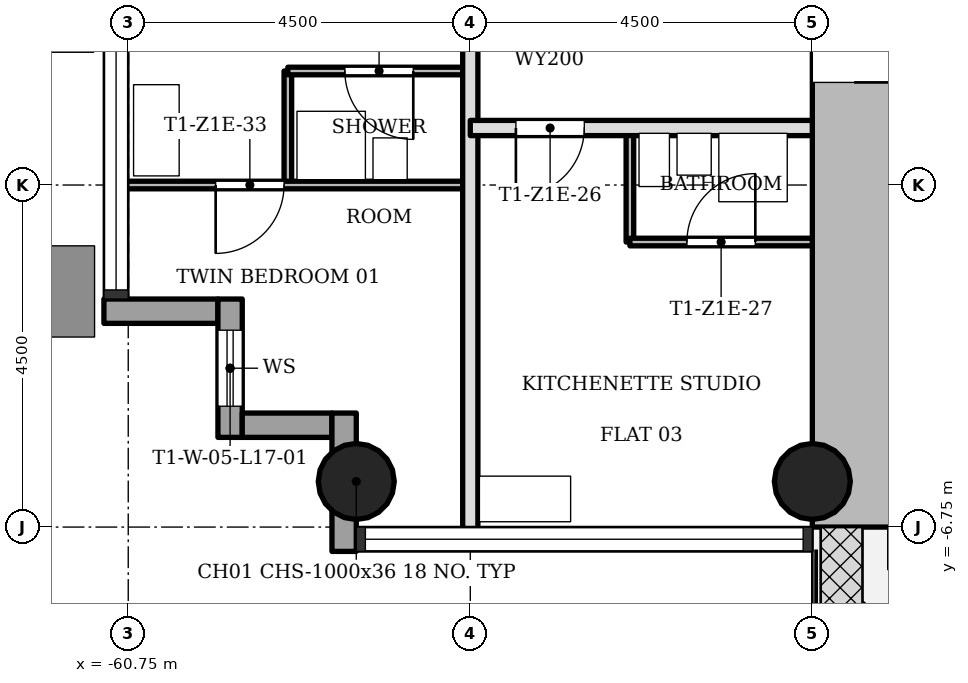
"""IFC4 building model, lengths in metres.
Left out: names, types, materials, properties, quantities, classifications, styles, units other than length and angle.
Written with IfcOpenShell. Run it as: python <this file> out.ifc"""

import sys

from ifc_helpers import new_model, si_unit, direction, frame, frame_2d, origin, origin_2d, place, context, subcontext, project, spatial, rectangle, hollow_circle, extrude, element, fill, save


model = new_model("IFC4")
c1 = context("Model", 3, precision=1e-05, world=origin(), true_north=direction((0.0, 1.0)))
c2 = subcontext(c1, "Body", "Model", "MODEL_VIEW")
j1 = project(units=[si_unit("LENGTHUNIT", "METRE"), si_unit("PLANEANGLEUNIT", "RADIAN")], contexts=[c1])
p1 = place(None, origin())
s1 = spatial("IfcSite", under=j1, at=p1, CompositionType="ELEMENT")
p2 = place(p1, origin())
s2 = spatial("IfcBuilding", under=s1, at=p2, CompositionType="ELEMENT")
p3 = place(p2, frame((0.0, 0.0, 65.3)))
s3 = spatial("IfcBuildingStorey", under=s2, at=p3, CompositionType="ELEMENT", Elevation=65.3)
p4 = place(p3, frame((-51.2, 5.65, 0.0), z_axis=(0.0, 0.0, 1.0), x_axis=(0.0, -1.0, 0.0)))
e1 = element("IfcWall", 1, at=p4, inside=s3, PredefinedType="SHEAR", context=c2, shape_type="SweptSolid", body=[
    extrude(rectangle(XDim=12.4, YDim=1.1, at=frame_2d((6.2, 0.0))), origin(), (0.0, 0.0, 1.0), 3.4),
])
p5 = place(p4, frame((4.75, 0.0, 0.0)))
e2 = element("IfcOpeningElement", 2, at=p5, cuts=e1, PredefinedType="OPENING", context=c2, shape_type="SweptSolid", body=[
    extrude(rectangle(XDim=1.8, YDim=2.1, at=frame_2d((0.9, 1.05))), frame((0.0, 0.56, 0.0), z_axis=(0.0, -1.0, 0.0), x_axis=(1.0, 0.0, 0.0)), (0.0, 0.0, 1.0), 1.12),
])
for number, where, z_axis, x_axis in (
    (3, (-51.75, -6.15, 0.0), (0.0, 0.0, 1.0), (1.0, 0.0, 0.0)),
    (4, (-57.75, -6.15, 0.0), (0.0, 0.0, 1.0), (1.0, 0.0, 0.0)),
):
    element("IfcColumn", number, at=place(p3, frame(where, z_axis=z_axis, x_axis=x_axis)), inside=s3, PredefinedType="COLUMN", context=c2, shape_type="SweptSolid", body=[
        extrude(hollow_circle(Radius=0.5, WallThickness=0.036, at=origin_2d()), origin(), (0.0, 0.0, 1.0), 3.4),
    ])
p6 = place(p3, frame((-61.07, -3.91, -0.3), z_axis=(0.0, 0.0, 1.0), x_axis=(1.0, 0.0, 0.0)))
e5 = element("IfcWall", 5, at=p6, inside=s3, PredefinedType="STANDARD", context=c2, shape_type="SweptSolid", body=[
    extrude(rectangle(XDim=1.5, YDim=0.32, at=frame_2d((0.75, 0.0))), origin(), (0.0, 0.0, 1.0), 3.4),
])
p7 = place(p3, frame((-59.41, -3.75, -0.3), z_axis=(0.0, 0.0, 1.0), x_axis=(0.0, -1.0, 0.0)))
e6 = element("IfcWall", 6, at=p7, inside=s3, PredefinedType="STANDARD", context=c2, shape_type="SweptSolid", body=[
    extrude(rectangle(XDim=1.82, YDim=0.32, at=frame_2d((0.91, 0.0))), origin(), (0.0, 0.0, 1.0), 3.4),
])
p8 = place(p7, frame((0.41, 0.0, 1.2)))
e7 = element("IfcOpeningElement", 7, at=p8, cuts=e6, PredefinedType="OPENING", context=c2, shape_type="SweptSolid", body=[
    extrude(rectangle(XDim=1.0, YDim=1.5, at=frame_2d((0.5, 0.75))), frame((0.0, 0.17, 0.0), z_axis=(0.0, -1.0, 0.0), x_axis=(1.0, 0.0, 0.0)), (0.0, 0.0, 1.0), 0.34),
])
p9 = place(p3, frame((-59.25, -5.41, -0.3), z_axis=(0.0, 0.0, 1.0), x_axis=(1.0, 0.0, 0.0)))
e8 = element("IfcWall", 8, at=p9, inside=s3, PredefinedType="STANDARD", context=c2, shape_type="SweptSolid", body=[
    extrude(rectangle(XDim=1.18, YDim=0.32, at=frame_2d((0.59, 0.0))), origin(), (0.0, 0.0, 1.0), 3.4),
])
p10 = place(p3, frame((-57.91, -5.25, -0.3), z_axis=(0.0, 0.0, 1.0), x_axis=(0.0, -1.0, 0.0)))
e9 = element("IfcWall", 9, at=p10, inside=s3, PredefinedType="STANDARD", context=c2, shape_type="SweptSolid", body=[
    extrude(rectangle(XDim=1.82, YDim=0.32, at=frame_2d((0.91, 0.0))), origin(), (0.0, 0.0, 1.0), 3.4),
])
p11 = place(p3, frame((-58.65, -2.25, 0.0), z_axis=(0.0, 0.0, 1.0), x_axis=(0.0, 1.0, 0.0)))
e10 = element("IfcWall", 10, at=p11, inside=s3, PredefinedType="PARTITIONING", context=c2, shape_type="SweptSolid", body=[
    extrude(rectangle(XDim=1.5, YDim=0.1, at=frame_2d((0.75, 0.0))), origin(), (0.0, 0.0, 1.0), 3.0),
])
p12 = place(p3, frame((-56.25, -6.85, 0.0), z_axis=(0.0, 0.0, 1.0), x_axis=(0.0, 1.0, 0.0)))
e11 = element("IfcWall", 11, at=p12, inside=s3, PredefinedType="SOLIDWALL", context=c2, shape_type="SweptSolid", body=[
    extrude(rectangle(XDim=13.7, YDim=0.2, at=frame_2d((6.85, 0.0))), origin(), (0.0, 0.0, 1.0), 3.0),
])
p13 = place(p12, frame((6.4, 0.0, 0.0)))
e12 = element("IfcOpeningElement", 12, at=p13, cuts=e11, PredefinedType="OPENING", context=c2, shape_type="SweptSolid", body=[
    extrude(rectangle(XDim=0.9, YDim=2.1, at=frame_2d((0.45, 1.05))), frame((0.0, 0.11, 0.0), z_axis=(0.0, -1.0, 0.0), x_axis=(1.0, 0.0, 0.0)), (0.0, 0.0, 1.0), 0.22),
])
p14 = place(p3, frame((-54.15, -3.0, 0.0), z_axis=(0.0, 0.0, 1.0), x_axis=(0.0, 1.0, 0.0)))
e13 = element("IfcWall", 13, at=p14, inside=s3, PredefinedType="PARTITIONING", context=c2, shape_type="SweptSolid", body=[
    extrude(rectangle(XDim=1.5, YDim=0.1, at=frame_2d((0.75, 0.0))), origin(), (0.0, 0.0, 1.0), 3.0),
])
p15 = place(p3, frame((-54.15, -3.0, 0.0), z_axis=(0.0, 0.0, 1.0), x_axis=(1.0, 0.0, 0.0)))
e14 = element("IfcWall", 14, at=p15, inside=s3, PredefinedType="PARTITIONING", context=c2, shape_type="SweptSolid", body=[
    extrude(rectangle(XDim=2.4, YDim=0.1, at=frame_2d((1.2, 0.0))), origin(), (0.0, 0.0, 1.0), 3.0),
])
p16 = place(p15, frame((0.75, 0.0, 0.0)))
e15 = element("IfcOpeningElement", 15, at=p16, cuts=e14, PredefinedType="OPENING", context=c2, shape_type="SweptSolid", body=[
    extrude(rectangle(XDim=0.9, YDim=2.1, at=frame_2d((0.45, 1.05))), frame((0.0, 0.06, 0.0), z_axis=(0.0, -1.0, 0.0), x_axis=(1.0, 0.0, 0.0)), (0.0, 0.0, 1.0), 0.12),
])
p17 = place(p3, frame((-60.85, -2.25, 0.0), z_axis=(0.0, 0.0, 1.0), x_axis=(1.0, 0.0, 0.0)))
e16 = element("IfcWall", 16, at=p17, inside=s3, PredefinedType="PARTITIONING", context=c2, shape_type="SweptSolid", body=[
    extrude(rectangle(XDim=4.6, YDim=0.1, at=frame_2d((2.3, 0.0))), origin(), (0.0, 0.0, 1.0), 3.0),
])
p18 = place(p17, frame((1.25, 0.0, 0.0)))
e17 = element("IfcOpeningElement", 17, at=p18, cuts=e16, PredefinedType="OPENING", context=c2, shape_type="SweptSolid", body=[
    extrude(rectangle(XDim=0.9, YDim=2.1, at=frame_2d((0.45, 1.05))), frame((0.0, 0.06, 0.0), z_axis=(0.0, -1.0, 0.0), x_axis=(1.0, 0.0, 0.0)), (0.0, 0.0, 1.0), 0.12),
])
p19 = place(p3, frame((-56.25, -1.5, 0.0), z_axis=(0.0, 0.0, 1.0), x_axis=(1.0, 0.0, 0.0)))
e18 = element("IfcWall", 18, at=p19, inside=s3, PredefinedType="SOLIDWALL", context=c2, shape_type="SweptSolid", body=[
    extrude(rectangle(XDim=4.5, YDim=0.2, at=frame_2d((2.25, 0.0))), origin(), (0.0, 0.0, 1.0), 3.0),
])
p20 = place(p19, frame((0.6, 0.0, 0.0)))
e19 = element("IfcOpeningElement", 19, at=p20, cuts=e18, PredefinedType="OPENING", context=c2, shape_type="SweptSolid", body=[
    extrude(rectangle(XDim=0.9, YDim=2.1, at=frame_2d((0.45, 1.05))), frame((0.0, 0.11, 0.0), z_axis=(0.0, -1.0, 0.0), x_axis=(1.0, 0.0, 0.0)), (0.0, 0.0, 1.0), 0.22),
])
p21 = place(p3, frame((-58.65, -0.75, 0.0), z_axis=(0.0, 0.0, 1.0), x_axis=(1.0, 0.0, 0.0)))
e20 = element("IfcWall", 20, at=p21, inside=s3, PredefinedType="PARTITIONING", context=c2, shape_type="SweptSolid", body=[
    extrude(rectangle(XDim=2.4, YDim=0.1, at=frame_2d((1.2, 0.0))), origin(), (0.0, 0.0, 1.0), 3.0),
])
p22 = place(p21, frame((0.75, 0.0, 0.0)))
e21 = element("IfcOpeningElement", 21, at=p22, cuts=e20, PredefinedType="OPENING", context=c2, shape_type="SweptSolid", body=[
    extrude(rectangle(XDim=0.9, YDim=2.1, at=frame_2d((0.45, 1.05))), frame((0.0, 0.06, 0.0), z_axis=(0.0, -1.0, 0.0), x_axis=(1.0, 0.0, 0.0)), (0.0, 0.0, 1.0), 0.12),
])
p23 = place(p20, origin())
e22 = element("IfcDoor", 22, at=p23, inside=s3, OperationType="SINGLE_SWING_LEFT", PredefinedType="DOOR", context=c2, shape_type="SweptSolid", body=[
    extrude(rectangle(XDim=0.9, YDim=2.1, at=frame_2d((0.45, 1.05))), frame((0.0, 0.025, 0.0), z_axis=(0.0, -1.0, 0.0), x_axis=(1.0, 0.0, 0.0)), (0.0, 0.0, 1.0), 0.05),
])
fill(e19, e22)
p24 = place(p16, origin())
e23 = element("IfcDoor", 23, at=p24, inside=s3, OperationType="SINGLE_SWING_LEFT", PredefinedType="DOOR", context=c2, shape_type="SweptSolid", body=[
    extrude(rectangle(XDim=0.9, YDim=2.1, at=frame_2d((0.45, 1.05))), frame((0.0, 0.025, 0.0), z_axis=(0.0, -1.0, 0.0), x_axis=(1.0, 0.0, 0.0)), (0.0, 0.0, 1.0), 0.05),
])
fill(e15, e23)
p25 = place(p22, origin())
e24 = element("IfcDoor", 24, at=p25, inside=s3, OperationType="SINGLE_SWING_RIGHT", PredefinedType="DOOR", context=c2, shape_type="SweptSolid", body=[
    extrude(rectangle(XDim=0.9, YDim=2.1, at=frame_2d((0.45, 1.05))), frame((0.0, 0.025, 0.0), z_axis=(0.0, -1.0, 0.0), x_axis=(1.0, 0.0, 0.0)), (0.0, 0.0, 1.0), 0.05),
])
fill(e21, e24)
p26 = place(p18, origin())
e25 = element("IfcDoor", 25, at=p26, inside=s3, OperationType="SINGLE_SWING_LEFT", PredefinedType="DOOR", context=c2, shape_type="SweptSolid", body=[
    extrude(rectangle(XDim=0.9, YDim=2.1, at=frame_2d((0.45, 1.05))), frame((0.0, 0.025, 0.0), z_axis=(0.0, -1.0, 0.0), x_axis=(1.0, 0.0, 0.0)), (0.0, 0.0, 1.0), 0.05),
])
fill(e17, e25)
p27 = place(p5, origin())
e26 = element("IfcDoor", 26, at=p27, inside=s3, OperationType="SINGLE_SWING_LEFT", PredefinedType="DOOR", context=c2, shape_type="SweptSolid", body=[
    extrude(rectangle(XDim=1.8, YDim=2.1, at=frame_2d((0.9, 1.05))), frame((0.0, 0.025, 0.0), z_axis=(0.0, -1.0, 0.0), x_axis=(1.0, 0.0, 0.0)), (0.0, 0.0, 1.0), 0.05),
])
fill(e2, e26)
p28 = place(p8, origin())
e27 = element("IfcWindow", 27, at=p28, inside=s3, PartitioningType="SINGLE_PANEL", PredefinedType="WINDOW", context=c2, shape_type="SweptSolid", body=[
    extrude(rectangle(XDim=1.0, YDim=1.5, at=frame_2d((0.5, 0.75))), frame((0.0, 0.03, 0.0), z_axis=(0.0, -1.0, 0.0), x_axis=(1.0, 0.0, 0.0)), (0.0, 0.0, 1.0), 0.06),
])
fill(e7, e27)
save(model, sys.argv[1])
